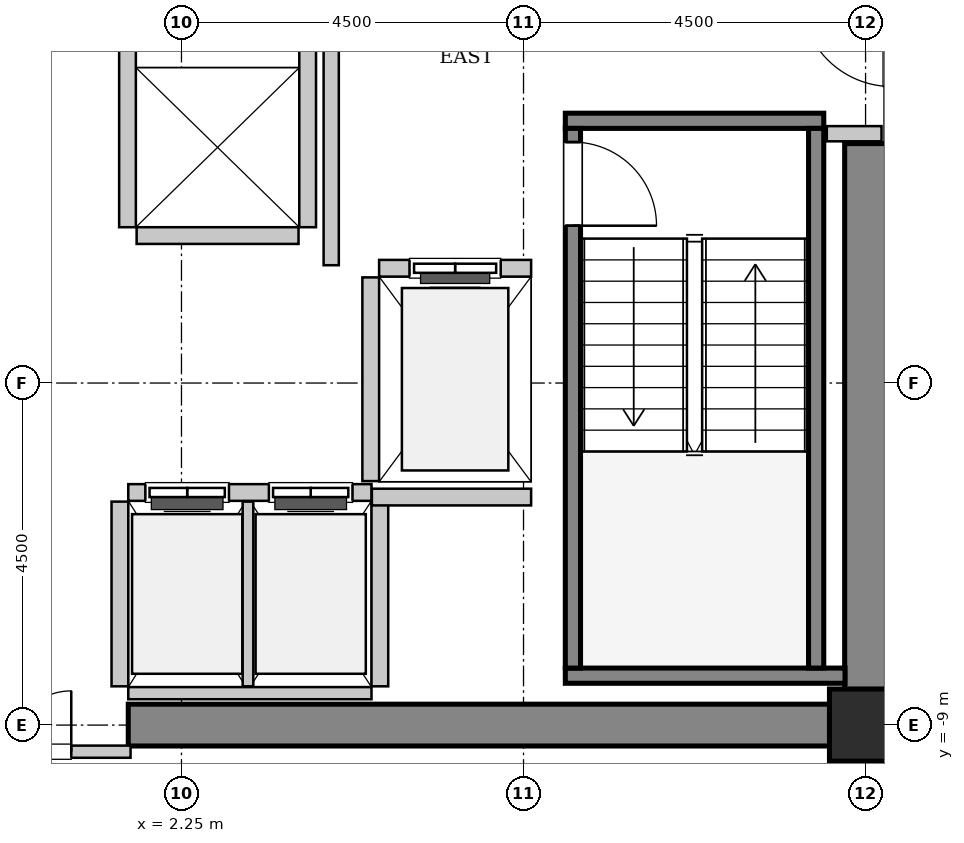
"""IFC4 building model, lengths in metres.
Left out: names, types, materials, properties, quantities, classifications, styles, units other than length and angle.
Written with IfcOpenShell. Run it as: python <this file> out.ifc"""

import sys

from ifc_helpers import new_model, si_unit, direction, frame, frame_2d, origin, origin_2d, place, context, subcontext, project, spatial, rectangle, hollow_rectangle, extrude, source, transform, mapped, element, fill, save


model = new_model("IFC4")
c1 = context("Model", 3, precision=1e-05, world=origin(), true_north=direction((0.0, 1.0)))
c2 = subcontext(c1, "Body", "Model", "MODEL_VIEW")
j1 = project(units=[si_unit("LENGTHUNIT", "METRE"), si_unit("PLANEANGLEUNIT", "RADIAN")], contexts=[c1])
p1 = place(None, origin())
s1 = spatial("IfcSite", under=j1, at=p1, CompositionType="ELEMENT")
p2 = place(p1, origin())
s2 = spatial("IfcBuilding", under=s1, at=p2, CompositionType="ELEMENT")
p3 = place(p2, frame((0.0, 0.0, 152.6)))
s3 = spatial("IfcBuildingStorey", under=s2, at=p3, CompositionType="ELEMENT", Elevation=152.6)
m1 = source(origin(), c2, "Body", "SweptSolid", [
    extrude(rectangle(XDim=9.975, YDim=0.55, at=frame_2d((4.987, 0.0))), origin(), (0.0, 0.0, 1.0), 3.8),
])
p4 = place(p3, frame((1.55, -9.0, 0.0), z_axis=(0.0, 0.0, 1.0), x_axis=(1.0, 0.0, 0.0)))
e1 = element("IfcWall", 1, at=p4, inside=s3, PredefinedType="SHEAR", context=c2, shape_type="MappedRepresentation", body=[
    mapped(m1, transform((0.0, 0.0, 0.0), x_axis=(1.0, 0.0, 0.0), y_axis=(0.0, 1.0, 0.0), z_axis=(0.0, 0.0, 1.0), scale=1.0)),
])
m2 = source(origin(), c2, "Body", "SweptSolid", [
    extrude(rectangle(XDim=7.375, YDim=0.55, at=frame_2d((3.688, 0.0))), origin(), (0.0, 0.0, 1.0), 3.8),
])
p5 = place(p3, frame((11.25, -8.725, 0.0), z_axis=(0.0, 0.0, 1.0), x_axis=(0.0, 1.0, 0.0)))
e2 = element("IfcWall", 2, at=p5, inside=s3, PredefinedType="SHEAR", context=c2, shape_type="MappedRepresentation", body=[
    mapped(m2, transform((0.0, 0.0, 0.0), x_axis=(1.0, 0.0, 0.0), y_axis=(0.0, 1.0, 0.0), z_axis=(0.0, 0.0, 1.0), scale=1.0)),
])
m3 = source(origin(), c2, "Body", "SweptSolid", [
    extrude(hollow_rectangle(XDim=0.95, YDim=0.95, WallThickness=0.045, InnerFilletRadius=0.045, OuterFilletRadius=0.09, at=origin_2d()), origin(), (0.0, 0.0, 1.0), 3.8),
])
p6 = place(p3, frame((11.25, -9.0, 0.0), z_axis=(0.0, 0.0, 1.0), x_axis=(1.0, 0.0, 0.0)))
e3 = element("IfcColumn", 3, at=p6, inside=s3, PredefinedType="COLUMN", context=c2, shape_type="MappedRepresentation", body=[
    mapped(m3, transform((0.0, 0.0, 0.0), x_axis=(1.0, 0.0, 0.0), y_axis=(0.0, 1.0, 0.0), z_axis=(0.0, 0.0, 1.0), scale=1.0)),
])
m4 = source(origin(), c2, "Body", "SweptSolid", [
    extrude(rectangle(XDim=3.4, YDim=0.2, at=frame_2d((1.7, 0.0))), origin(), (0.0, 0.0, 1.0), 3.8),
])
p7 = place(p3, frame((7.3, -1.05, 0.0), z_axis=(0.0, 0.0, 1.0), x_axis=(1.0, 0.0, 0.0)))
e4 = element("IfcWall", 4, at=p7, inside=s3, PredefinedType="SOLIDWALL", context=c2, shape_type="MappedRepresentation", body=[
    mapped(m4, transform((0.0, 0.0, 0.0), x_axis=(1.0, 0.0, 0.0), y_axis=(0.0, 1.0, 0.0), z_axis=(0.0, 0.0, 1.0), scale=1.0)),
])
m5 = source(origin(), c2, "Body", "SweptSolid", [
    extrude(rectangle(XDim=3.68, YDim=0.2, at=frame_2d((1.84, 0.0))), origin(), (0.0, 0.0, 1.0), 3.8),
])
p8 = place(p3, frame((7.3, -8.35, 0.0), z_axis=(0.0, 0.0, 1.0), x_axis=(1.0, 0.0, 0.0)))
e5 = element("IfcWall", 5, at=p8, inside=s3, PredefinedType="SOLIDWALL", context=c2, shape_type="MappedRepresentation", body=[
    mapped(m5, transform((0.0, 0.0, 0.0), x_axis=(1.0, 0.0, 0.0), y_axis=(0.0, 1.0, 0.0), z_axis=(0.0, 0.0, 1.0), scale=1.0)),
])
m6 = source(origin(), c2, "Body", "SweptSolid", [
    extrude(rectangle(XDim=7.1, YDim=0.2, at=frame_2d((3.55, 0.0))), origin(), (0.0, 0.0, 1.0), 3.8),
])
p9 = place(p3, frame((7.4, -1.15, 0.0), z_axis=(0.0, 0.0, 1.0), x_axis=(0.0, -1.0, 0.0)))
e6 = element("IfcWall", 6, at=p9, inside=s3, PredefinedType="SOLIDWALL", context=c2, shape_type="MappedRepresentation", body=[
    mapped(m6, transform((0.0, 0.0, 0.0), x_axis=(1.0, 0.0, 0.0), y_axis=(0.0, 1.0, 0.0), z_axis=(0.0, 0.0, 1.0), scale=1.0)),
])
p10 = place(p9, frame((0.18, 0.0, 0.0)))
e7 = element("IfcOpeningElement", 7, at=p10, cuts=e6, PredefinedType="OPENING", context=c2, shape_type="SweptSolid", body=[
    extrude(rectangle(XDim=1.1, YDim=2.15, at=frame_2d((0.55, 1.075))), frame((0.0, 0.11, 0.0), z_axis=(0.0, -1.0, 0.0), x_axis=(1.0, 0.0, 0.0)), (0.0, 0.0, 1.0), 0.22),
])
p11 = place(p3, frame((10.6, -1.15, 0.0), z_axis=(0.0, 0.0, 1.0), x_axis=(0.0, -1.0, 0.0)))
e8 = element("IfcWall", 8, at=p11, inside=s3, PredefinedType="SOLIDWALL", context=c2, shape_type="MappedRepresentation", body=[
    mapped(m6, transform((0.0, 0.0, 0.0), x_axis=(1.0, 0.0, 0.0), y_axis=(0.0, 1.0, 0.0), z_axis=(0.0, 0.0, 1.0), scale=1.0)),
])
m7 = source(origin(), c2, "Body", "SweptSolid", [
    extrude(rectangle(XDim=2.0, YDim=0.22, at=frame_2d((1.0, 0.0))), origin(), (0.0, 0.0, 1.0), 3.535),
])
p12 = place(p3, frame((6.85, -2.99, 0.0), z_axis=(0.0, 0.0, 1.0), x_axis=(-1.0, 0.0, 0.0)))
e9 = element("IfcWall", 9, at=p12, inside=s3, PredefinedType="SOLIDWALL", context=c2, shape_type="MappedRepresentation", body=[
    mapped(m7, transform((0.0, 0.0, 0.0), x_axis=(1.0, 0.0, 0.0), y_axis=(0.0, 1.0, 0.0), z_axis=(0.0, 0.0, 1.0), scale=1.0)),
])
p13 = place(p12, frame((0.4, 0.0, 0.0)))
e10 = element("IfcOpeningElement", 10, at=p13, cuts=e9, PredefinedType="OPENING", context=c2, shape_type="SweptSolid", body=[
    extrude(rectangle(XDim=1.2, YDim=2.2, at=frame_2d((0.6, 1.1))), frame((0.0, 0.12, 0.0), z_axis=(0.0, -1.0, 0.0), x_axis=(1.0, 0.0, 0.0)), (0.0, 0.0, 1.0), 0.24),
])
m8 = source(origin(), c2, "Body", "SweptSolid", [
    extrude(rectangle(XDim=2.68, YDim=0.22, at=frame_2d((1.34, 0.0))), origin(), (0.0, 0.0, 1.0), 3.535),
])
p14 = place(p3, frame((4.74, -3.11, 0.0), z_axis=(0.0, 0.0, 1.0), x_axis=(0.0, -1.0, 0.0)))
e11 = element("IfcWall", 11, at=p14, inside=s3, PredefinedType="SOLIDWALL", context=c2, shape_type="MappedRepresentation", body=[
    mapped(m8, transform((0.0, 0.0, 0.0), x_axis=(1.0, 0.0, 0.0), y_axis=(0.0, 1.0, 0.0), z_axis=(0.0, 0.0, 1.0), scale=1.0)),
])
m9 = source(origin(), c2, "Body", "SweptSolid", [
    extrude(rectangle(XDim=3.2, YDim=0.22, at=frame_2d((1.6, 0.0))), origin(), (0.0, 0.0, 1.0), 3.535),
])
p15 = place(p3, frame((4.75, -5.94, 0.0), z_axis=(0.0, 0.0, 1.0), x_axis=(-1.0, 0.0, 0.0)))
e12 = element("IfcWall", 12, at=p15, inside=s3, PredefinedType="SOLIDWALL", context=c2, shape_type="MappedRepresentation", body=[
    mapped(m9, transform((0.0, 0.0, 0.0), x_axis=(1.0, 0.0, 0.0), y_axis=(0.0, 1.0, 0.0), z_axis=(0.0, 0.0, 1.0), scale=1.0)),
])
p16 = place(p15, frame((1.875, 0.0, 0.0)))
e13 = element("IfcOpeningElement", 13, at=p16, cuts=e12, PredefinedType="OPENING", context=c2, shape_type="SweptSolid", body=[
    extrude(rectangle(XDim=1.1, YDim=2.2, at=frame_2d((0.55, 1.1))), frame((0.0, 0.12, 0.0), z_axis=(0.0, -1.0, 0.0), x_axis=(1.0, 0.0, 0.0)), (0.0, 0.0, 1.0), 0.24),
])
p17 = place(p15, frame((0.25, 0.0, 0.0)))
e14 = element("IfcOpeningElement", 14, at=p17, cuts=e12, PredefinedType="OPENING", context=c2, shape_type="SweptSolid", body=[
    extrude(rectangle(XDim=1.1, YDim=2.2, at=frame_2d((0.55, 1.1))), frame((0.0, 0.12, 0.0), z_axis=(0.0, -1.0, 0.0), x_axis=(1.0, 0.0, 0.0)), (0.0, 0.0, 1.0), 0.24),
])
m10 = source(origin(), c2, "Body", "SweptSolid", [
    extrude(rectangle(XDim=3.2, YDim=0.16, at=frame_2d((1.6, 0.0))), origin(), (0.0, 0.0, 1.0), 2.425),
])
p18 = place(p3, frame((1.55, -8.58, 0.0), z_axis=(0.0, 0.0, 1.0), x_axis=(1.0, 0.0, 0.0)))
e15 = element("IfcWall", 15, at=p18, inside=s3, PredefinedType="PARTITIONING", context=c2, shape_type="MappedRepresentation", body=[
    mapped(m10, transform((0.0, 0.0, 0.0), x_axis=(1.0, 0.0, 0.0), y_axis=(0.0, 1.0, 0.0), z_axis=(0.0, 0.0, 1.0), scale=1.0)),
])
m11 = source(origin(), c2, "Body", "SweptSolid", [
    extrude(rectangle(XDim=2.43, YDim=0.22, at=frame_2d((1.215, 0.0))), origin(), (0.0, 0.0, 1.0), 3.535),
])
p19 = place(p3, frame((1.44, -6.06, 0.0), z_axis=(0.0, 0.0, 1.0), x_axis=(0.0, -1.0, 0.0)))
e16 = element("IfcWall", 16, at=p19, inside=s3, PredefinedType="SOLIDWALL", context=c2, shape_type="MappedRepresentation", body=[
    mapped(m11, transform((0.0, 0.0, 0.0), x_axis=(1.0, 0.0, 0.0), y_axis=(0.0, 1.0, 0.0), z_axis=(0.0, 0.0, 1.0), scale=1.0)),
])
m12 = source(origin(), c2, "Body", "SweptSolid", [
    extrude(rectangle(XDim=2.43, YDim=0.14, at=frame_2d((1.215, 0.0))), origin(), (0.0, 0.0, 1.0), 3.535),
])
p20 = place(p3, frame((3.125, -8.49, 0.0), z_axis=(0.0, 0.0, 1.0), x_axis=(0.0, 1.0, 0.0)))
e17 = element("IfcWall", 17, at=p20, inside=s3, PredefinedType="PARTITIONING", context=c2, shape_type="MappedRepresentation", body=[
    mapped(m12, transform((0.0, 0.0, 0.0), x_axis=(1.0, 0.0, 0.0), y_axis=(0.0, 1.0, 0.0), z_axis=(0.0, 0.0, 1.0), scale=1.0)),
])
p21 = place(p3, frame((4.86, -8.49, 0.0), z_axis=(0.0, 0.0, 1.0), x_axis=(0.0, 1.0, 0.0)))
e18 = element("IfcWall", 18, at=p21, inside=s3, PredefinedType="SOLIDWALL", context=c2, shape_type="MappedRepresentation", body=[
    mapped(m11, transform((0.0, 0.0, 0.0), x_axis=(1.0, 0.0, 0.0), y_axis=(0.0, 1.0, 0.0), z_axis=(0.0, 0.0, 1.0), scale=1.0)),
])
m13 = source(origin(), c2, "Body", "SweptSolid", [
    extrude(rectangle(XDim=4.9, YDim=0.22, at=frame_2d((2.45, 0.0))), origin(), (0.0, 0.0, 1.0), 3.535),
])
for number, where, z_axis, x_axis in (
    (19, (1.54, 2.45, 0.0), (0.0, 0.0, 1.0), (0.0, -1.0, 0.0)),
    (20, (3.91, -2.45, 0.0), (0.0, 0.0, 1.0), (0.0, 1.0, 0.0)),
):
    element("IfcWall", number, at=place(p3, frame(where, z_axis=z_axis, x_axis=x_axis)), inside=s3, PredefinedType="SOLIDWALL", context=c2, shape_type="MappedRepresentation", body=[
        mapped(m13, transform((0.0, 0.0, 0.0), x_axis=(1.0, 0.0, 0.0), y_axis=(0.0, 1.0, 0.0), z_axis=(0.0, 0.0, 1.0), scale=1.0)),
    ])
m14 = source(origin(), c2, "Body", "SweptSolid", [
    extrude(rectangle(XDim=2.13, YDim=0.22, at=frame_2d((1.065, 0.0))), origin(), (0.0, 0.0, 1.0), 3.535),
])
p22 = place(p3, frame((1.66, -2.56, 0.0), z_axis=(0.0, 0.0, 1.0), x_axis=(1.0, 0.0, 0.0)))
e21 = element("IfcWall", 21, at=p22, inside=s3, PredefinedType="SOLIDWALL", context=c2, shape_type="MappedRepresentation", body=[
    mapped(m14, transform((0.0, 0.0, 0.0), x_axis=(1.0, 0.0, 0.0), y_axis=(0.0, 1.0, 0.0), z_axis=(0.0, 0.0, 1.0), scale=1.0)),
])
m15 = source(origin(), c2, "Body", "SweptSolid", [
    extrude(rectangle(XDim=2.095, YDim=0.22, at=frame_2d((1.048, 0.0))), origin(), (0.0, 0.0, 1.0), 3.535),
])
p23 = place(p3, frame((4.755, -6.0, 0.0), z_axis=(0.0, 0.0, 1.0), x_axis=(1.0, 0.0, 0.0)))
e22 = element("IfcWall", 22, at=p23, inside=s3, PredefinedType="SOLIDWALL", context=c2, shape_type="MappedRepresentation", body=[
    mapped(m15, transform((0.0, 0.0, 0.0), x_axis=(1.0, 0.0, 0.0), y_axis=(0.0, 1.0, 0.0), z_axis=(0.0, 0.0, 1.0), scale=1.0)),
])
m16 = source(origin(), c2, "Body", "SweptSolid", [
    extrude(rectangle(XDim=5.9, YDim=0.2, at=frame_2d((2.95, 0.0))), origin(), (0.0, 0.0, 1.0), 3.535),
])
p24 = place(p3, frame((4.22, -2.95, 0.0), z_axis=(0.0, 0.0, 1.0), x_axis=(0.0, 1.0, 0.0)))
e23 = element("IfcWall", 23, at=p24, inside=s3, PredefinedType="PARTITIONING", context=c2, shape_type="MappedRepresentation", body=[
    mapped(m16, transform((0.0, 0.0, 0.0), x_axis=(1.0, 0.0, 0.0), y_axis=(0.0, 1.0, 0.0), z_axis=(0.0, 0.0, 1.0), scale=1.0)),
])
m17 = source(origin(), c2, "Body", "SweptSolid", [
    extrude(rectangle(XDim=0.72, YDim=0.2, at=frame_2d((0.36, 0.0))), origin(), (0.0, 0.0, 1.0), 3.535),
])
p25 = place(p3, frame((10.74, -1.22, 0.0), z_axis=(0.0, 0.0, 1.0), x_axis=(1.0, 0.0, 0.0)))
e24 = element("IfcWall", 24, at=p25, inside=s3, PredefinedType="PARTITIONING", context=c2, shape_type="MappedRepresentation", body=[
    mapped(m17, transform((0.0, 0.0, 0.0), x_axis=(1.0, 0.0, 0.0), y_axis=(0.0, 1.0, 0.0), z_axis=(0.0, 0.0, 1.0), scale=1.0)),
])
m18 = source(origin(), c2, "Body", "SweptSolid", [
    extrude(rectangle(XDim=3.16, YDim=0.16, at=frame_2d((1.58, 0.0))), origin(), (0.0, 0.0, 1.0), 2.425),
])
p26 = place(p3, frame((-1.58, -9.35, 0.0), z_axis=(0.0, 0.0, 1.0), x_axis=(1.0, 0.0, 0.0)))
e25 = element("IfcWall", 25, at=p26, inside=s3, PredefinedType="PARTITIONING", context=c2, shape_type="MappedRepresentation", body=[
    mapped(m18, transform((0.0, 0.0, 0.0), x_axis=(1.0, 0.0, 0.0), y_axis=(0.0, 1.0, 0.0), z_axis=(0.0, 0.0, 1.0), scale=1.0)),
])
p27 = place(p26, frame((0.78, 0.0, 0.0)))
e26 = element("IfcOpeningElement", 26, at=p27, cuts=e25, PredefinedType="OPENING", context=c2, shape_type="SweptSolid", body=[
    extrude(rectangle(XDim=1.6, YDim=2.3, at=frame_2d((0.8, 1.15))), frame((0.0, 0.09, 0.0), z_axis=(0.0, -1.0, 0.0), x_axis=(1.0, 0.0, 0.0)), (0.0, 0.0, 1.0), 0.18),
])
m19 = source(origin(), c2, "Body", "SweptSolid", [
    extrude(rectangle(XDim=1.1, YDim=2.15, at=frame_2d((0.55, 1.075))), frame((0.0, 0.025, 0.0), z_axis=(0.0, -1.0, 0.0), x_axis=(1.0, 0.0, 0.0)), (0.0, 0.0, 1.0), 0.05),
])
p28 = place(p10, origin())
e27 = element("IfcDoor", 27, at=p28, inside=s3, OperationType="SINGLE_SWING_RIGHT", PredefinedType="DOOR", context=c2, shape_type="MappedRepresentation", body=[
    mapped(m19, transform((0.0, 0.0, 0.0), x_axis=(1.0, 0.0, 0.0), y_axis=(0.0, 1.0, 0.0), z_axis=(0.0, 0.0, 1.0), scale=1.0)),
])
fill(e7, e27)
m20 = source(origin(), c2, "Body", "SweptSolid", [
    extrude(rectangle(XDim=1.2, YDim=2.2, at=frame_2d((0.6, 1.1))), frame((0.0, 0.025, 0.0), z_axis=(0.0, -1.0, 0.0), x_axis=(1.0, 0.0, 0.0)), (0.0, 0.0, 1.0), 0.05),
])
p29 = place(p13, origin())
e28 = element("IfcDoor", 28, at=p29, inside=s3, OperationType="SLIDING_TO_LEFT", PredefinedType="DOOR", context=c2, shape_type="MappedRepresentation", body=[
    mapped(m20, transform((0.0, 0.0, 0.0), x_axis=(1.0, 0.0, 0.0), y_axis=(0.0, 1.0, 0.0), z_axis=(0.0, 0.0, 1.0), scale=1.0)),
])
fill(e10, e28)
m21 = source(origin(), c2, "Body", "SweptSolid", [
    extrude(rectangle(XDim=1.1, YDim=2.2, at=frame_2d((0.55, 1.1))), frame((0.0, 0.025, 0.0), z_axis=(0.0, -1.0, 0.0), x_axis=(1.0, 0.0, 0.0)), (0.0, 0.0, 1.0), 0.05),
])
p30 = place(p16, origin())
e29 = element("IfcDoor", 29, at=p30, inside=s3, OperationType="DOUBLE_DOOR_SLIDING", PredefinedType="DOOR", context=c2, shape_type="MappedRepresentation", body=[
    mapped(m21, transform((0.0, 0.0, 0.0), x_axis=(1.0, 0.0, 0.0), y_axis=(0.0, 1.0, 0.0), z_axis=(0.0, 0.0, 1.0), scale=1.0)),
])
fill(e13, e29)
p31 = place(p17, origin())
e30 = element("IfcDoor", 30, at=p31, inside=s3, OperationType="DOUBLE_DOOR_SLIDING", PredefinedType="DOOR", context=c2, shape_type="MappedRepresentation", body=[
    mapped(m21, transform((0.0, 0.0, 0.0), x_axis=(1.0, 0.0, 0.0), y_axis=(0.0, 1.0, 0.0), z_axis=(0.0, 0.0, 1.0), scale=1.0)),
])
fill(e14, e30)
m22 = source(origin(), c2, "Body", "SweptSolid", [
    extrude(rectangle(XDim=1.6, YDim=2.3, at=frame_2d((0.8, 1.15))), frame((0.0, 0.025, 0.0), z_axis=(0.0, -1.0, 0.0), x_axis=(1.0, 0.0, 0.0)), (0.0, 0.0, 1.0), 0.05),
])
p32 = place(p27, origin())
e31 = element("IfcDoor", 31, at=p32, inside=s3, OperationType="DOUBLE_DOOR_SINGLE_SWING", PredefinedType="DOOR", context=c2, shape_type="MappedRepresentation", body=[
    mapped(m22, transform((0.0, 0.0, 0.0), x_axis=(1.0, 0.0, 0.0), y_axis=(0.0, 1.0, 0.0), z_axis=(0.0, 0.0, 1.0), scale=1.0)),
])
fill(e26, e31)
save(model, sys.argv[1])
